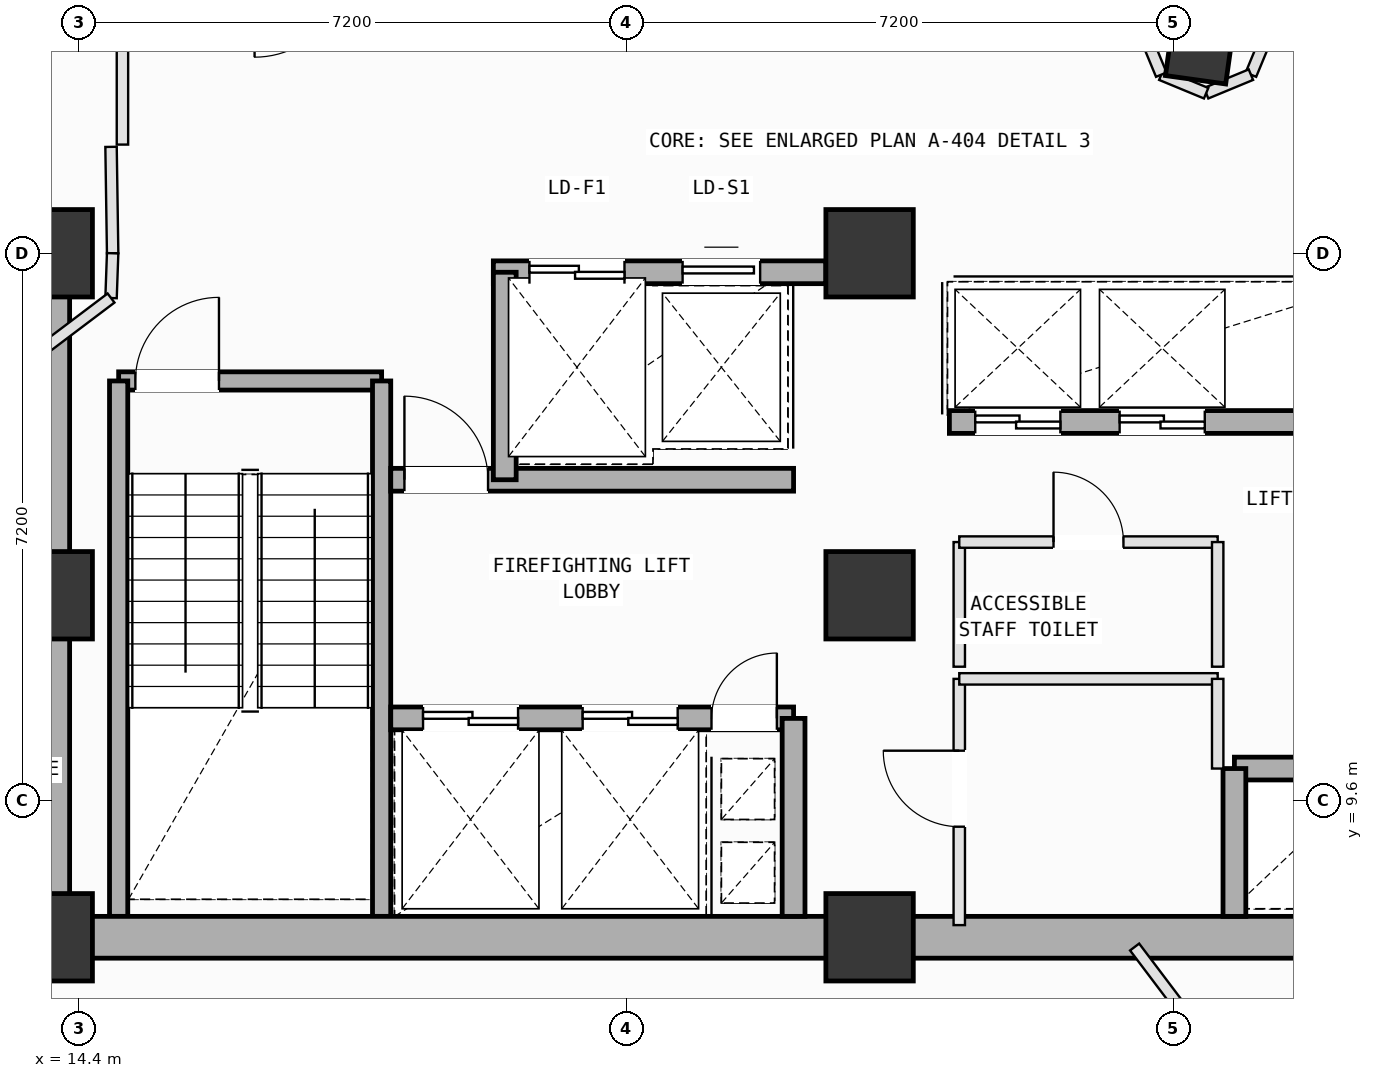
"""IFC4 building model, lengths in metres.
Left out: names, types, materials, properties, quantities, classifications, styles, units other than length and angle.
Written with IfcOpenShell. Run it as: python <this file> out.ifc"""

import sys

from ifc_helpers import new_model, si_unit, direction, frame, frame_2d, origin, origin_2d, place, context, subcontext, project, spatial, rectangle, extrude, element, fill, save


model = new_model("IFC4")
c1 = context("Model", 3, precision=1e-05, world=origin(), true_north=direction((0.0, 1.0)))
c2 = subcontext(c1, "Body", "Model", "MODEL_VIEW")
j1 = project(units=[si_unit("LENGTHUNIT", "METRE"), si_unit("PLANEANGLEUNIT", "RADIAN")], contexts=[c1])
p1 = place(None, origin())
s1 = spatial("IfcSite", under=j1, at=p1, CompositionType="ELEMENT")
p2 = place(p1, origin())
s2 = spatial("IfcBuilding", under=s1, at=p2, CompositionType="ELEMENT")
p3 = place(p2, frame((0.0, 0.0, 181.8)))
s3 = spatial("IfcBuildingStorey", under=s2, at=p3, CompositionType="ELEMENT", Elevation=181.8)
for number, where, z_axis, x_axis in (
    (1, (14.0, 7.8, 0.0), (0.0, 0.0, 1.0), (1.0, 0.0, 0.0)),
    (2, (14.0, 12.3, 0.0), (0.0, 0.0, 1.0), (1.0, 0.0, 0.0)),
    (3, (14.0, 16.8, 0.0), (0.0, 0.0, 1.0), (1.0, 0.0, 0.0)),
    (4, (24.8, 7.8, 0.0), (0.0, 0.0, 1.0), (1.0, 0.0, 0.0)),
    (5, (24.8, 12.3, 0.0), (0.0, 0.0, 1.0), (1.0, 0.0, 0.0)),
    (6, (24.8, 16.8, 0.0), (0.0, 0.0, 1.0), (1.0, 0.0, 0.0)),
):
    element("IfcColumn", number, at=place(p3, frame(where, z_axis=z_axis, x_axis=x_axis)), inside=s3, PredefinedType="COLUMN", context=c2, shape_type="SweptSolid", body=[
        extrude(rectangle(XDim=1.15, YDim=1.15, at=origin_2d()), origin(), (0.0, 0.0, 1.0), 4.0),
    ])
p4 = place(p3, frame((29.186, 19.776, 0.002), z_axis=(0.020946197976, -0.018137086877, 0.999616077737), x_axis=(-0.657890555794, 0.752613449927, 0.027441056587)))
e7 = element("IfcColumn", 7, at=p4, inside=s3, PredefinedType="COLUMN", context=c2, shape_type="SweptSolid", body=[
    extrude(rectangle(XDim=1.4, YDim=0.8, at=origin_2d()), origin(), (0.0, 0.0, 1.0), 3.998),
])
p5 = place(p3, frame((15.388, 3.365, 0.0), z_axis=(0.0, 0.0, 1.0), x_axis=(-0.602528511306, 0.798097358136, 0.0)))
e8 = element("IfcWall", 8, at=p5, inside=s3, PredefinedType="SOLIDWALL", context=c2, shape_type="SweptSolid", body=[
    extrude(rectangle(XDim=7.36, YDim=0.28, at=frame_2d((3.68, 0.0))), origin(), (0.0, 0.0, 1.0), 3.065),
])
p6 = place(p5, frame((2.514, 0.0, 0.75)))
e9 = element("IfcOpeningElement", 9, at=p6, cuts=e8, PredefinedType="OPENING", context=c2, shape_type="SweptSolid", body=[
    extrude(rectangle(XDim=1.6, YDim=1.95, at=frame_2d((0.8, 0.975))), frame((0.0, 0.15, 0.0), z_axis=(0.0, -1.0, 0.0), x_axis=(1.0, 0.0, 0.0)), (0.0, 0.0, 1.0), 0.3),
])
p7 = place(p3, frame((14.92, 15.12, 0.0), z_axis=(0.0, 0.0, 1.0), x_axis=(1.0, 0.0, 0.0)))
e10 = element("IfcWall", 10, at=p7, inside=s3, PredefinedType="SOLIDWALL", context=c2, shape_type="SweptSolid", body=[
    extrude(rectangle(XDim=3.46, YDim=0.24, at=frame_2d((1.73, 0.0))), origin(), (0.0, 0.0, 1.0), 3.78),
])
p8 = place(p7, frame((0.22, 0.0, 0.0)))
e11 = element("IfcOpeningElement", 11, at=p8, cuts=e10, PredefinedType="OPENING", context=c2, shape_type="SweptSolid", body=[
    extrude(rectangle(XDim=1.1, YDim=2.15, at=frame_2d((0.55, 1.075))), frame((0.0, 0.13, 0.0), z_axis=(0.0, -1.0, 0.0), x_axis=(1.0, 0.0, 0.0)), (0.0, 0.0, 1.0), 0.26),
])
for number, where, z_axis, x_axis in (
    (12, (18.38, 15.12, 0.0), (0.0, 0.0, 1.0), (0.0, -1.0, 0.0)),
    (13, (14.92, 8.075, 0.0), (0.0, 0.0, 1.0), (0.0, 1.0, 0.0)),
):
    element("IfcWall", number, at=place(p3, frame(where, z_axis=z_axis, x_axis=x_axis)), inside=s3, PredefinedType="SOLIDWALL", context=c2, shape_type="SweptSolid", body=[
        extrude(rectangle(XDim=7.045, YDim=0.24, at=frame_2d((3.522, 0.0))), origin(), (0.0, 0.0, 1.0), 3.78),
    ])
for number, where, z_axis, x_axis in (
    (14, (14.0, 7.8, 0.0), (0.0, 0.0, 1.0), (1.0, 0.0, 0.0)),
    (15, (24.8, 7.8, 0.0), (0.0, 0.0, 1.0), (1.0, 0.0, 0.0)),
):
    element("IfcWall", number, at=place(p3, frame(where, z_axis=z_axis, x_axis=x_axis)), inside=s3, PredefinedType="SHEAR", context=c2, shape_type="SweptSolid", body=[
        extrude(rectangle(XDim=10.8, YDim=0.55, at=frame_2d((5.4, 0.0))), origin(), (0.0, 0.0, 1.0), 3.78),
    ])
p9 = place(p3, frame((14.0, 16.8, 0.0), z_axis=(0.0, 0.0, 1.0), x_axis=(0.0, -1.0, 0.0)))
e16 = element("IfcWall", 16, at=p9, inside=s3, PredefinedType="SHEAR", context=c2, shape_type="SweptSolid", body=[
    extrude(rectangle(XDim=9.0, YDim=0.55, at=frame_2d((4.5, 0.0))), origin(), (0.0, 0.0, 1.0), 3.78),
])
p10 = place(p3, frame((19.85, 16.55, 0.0), z_axis=(0.0, 0.0, 1.0), x_axis=(1.0, 0.0, 0.0)))
e17 = element("IfcWall", 17, at=p10, inside=s3, PredefinedType="SOLIDWALL", context=c2, shape_type="SweptSolid", body=[
    extrude(rectangle(XDim=4.375, YDim=0.3, at=frame_2d((2.188, 0.0))), origin(), (0.0, 0.0, 1.0), 3.78),
])
p11 = place(p10, frame((0.475, 0.0, 0.0)))
e18 = element("IfcOpeningElement", 18, at=p11, cuts=e17, PredefinedType="OPENING", context=c2, shape_type="SweptSolid", body=[
    extrude(rectangle(XDim=1.25, YDim=2.18, at=frame_2d((0.625, 1.09))), frame((0.0, 0.16, 0.0), z_axis=(0.0, -1.0, 0.0), x_axis=(1.0, 0.0, 0.0)), (0.0, 0.0, 1.0), 0.32),
])
p12 = place(p10, frame((2.49, 0.0, 0.0)))
e19 = element("IfcOpeningElement", 19, at=p12, cuts=e17, PredefinedType="OPENING", context=c2, shape_type="SweptSolid", body=[
    extrude(rectangle(XDim=1.02, YDim=2.12, at=frame_2d((0.51, 1.06))), frame((0.0, 0.16, 0.0), z_axis=(0.0, -1.0, 0.0), x_axis=(1.0, 0.0, 0.0)), (0.0, 0.0, 1.0), 0.32),
])
p13 = place(p3, frame((18.5, 10.68, 0.0), z_axis=(0.0, 0.0, 1.0), x_axis=(1.0, 0.0, 0.0)))
e20 = element("IfcWall", 20, at=p13, inside=s3, PredefinedType="SOLIDWALL", context=c2, shape_type="SweptSolid", body=[
    extrude(rectangle(XDim=5.3, YDim=0.3, at=frame_2d((2.65, 0.0))), origin(), (0.0, 0.0, 1.0), 3.78),
])
p14 = place(p13, frame((4.22, 0.0, 0.0)))
e21 = element("IfcOpeningElement", 21, at=p14, cuts=e20, PredefinedType="OPENING", context=c2, shape_type="SweptSolid", body=[
    extrude(rectangle(XDim=0.86, YDim=2.06, at=frame_2d((0.43, 1.03))), frame((0.0, 0.16, 0.0), z_axis=(0.0, -1.0, 0.0), x_axis=(1.0, 0.0, 0.0)), (0.0, 0.0, 1.0), 0.32),
])
p15 = place(p13, frame((0.425, 0.0, 0.0)))
e22 = element("IfcOpeningElement", 22, at=p15, cuts=e20, PredefinedType="OPENING", context=c2, shape_type="SweptSolid", body=[
    extrude(rectangle(XDim=1.25, YDim=2.18, at=frame_2d((0.625, 1.09))), frame((0.0, 0.16, 0.0), z_axis=(0.0, -1.0, 0.0), x_axis=(1.0, 0.0, 0.0)), (0.0, 0.0, 1.0), 0.32),
])
p16 = place(p13, frame((2.525, 0.0, 0.0)))
e23 = element("IfcOpeningElement", 23, at=p16, cuts=e20, PredefinedType="OPENING", context=c2, shape_type="SweptSolid", body=[
    extrude(rectangle(XDim=1.25, YDim=2.18, at=frame_2d((0.625, 1.09))), frame((0.0, 0.16, 0.0), z_axis=(0.0, -1.0, 0.0), x_axis=(1.0, 0.0, 0.0)), (0.0, 0.0, 1.0), 0.32),
])
p17 = place(p3, frame((18.5, 13.82, 0.0), z_axis=(0.0, 0.0, 1.0), x_axis=(1.0, 0.0, 0.0)))
e24 = element("IfcWall", 24, at=p17, inside=s3, PredefinedType="SOLIDWALL", context=c2, shape_type="SweptSolid", body=[
    extrude(rectangle(XDim=5.3, YDim=0.3, at=frame_2d((2.65, 0.0))), origin(), (0.0, 0.0, 1.0), 3.78),
])
p18 = place(p17, frame((0.18, 0.0, 0.0)))
e25 = element("IfcOpeningElement", 25, at=p18, cuts=e24, PredefinedType="OPENING", context=c2, shape_type="SweptSolid", body=[
    extrude(rectangle(XDim=1.1, YDim=2.15, at=frame_2d((0.55, 1.075))), frame((0.0, 0.16, 0.0), z_axis=(0.0, -1.0, 0.0), x_axis=(1.0, 0.0, 0.0)), (0.0, 0.0, 1.0), 0.32),
])
p19 = place(p3, frame((23.8, 8.075, 0.0), z_axis=(0.0, 0.0, 1.0), x_axis=(0.0, 1.0, 0.0)))
e26 = element("IfcWall", 26, at=p19, inside=s3, PredefinedType="SOLIDWALL", context=c2, shape_type="SweptSolid", body=[
    extrude(rectangle(XDim=2.605, YDim=0.3, at=frame_2d((1.302, 0.0))), origin(), (0.0, 0.0, 1.0), 3.78),
])
p20 = place(p3, frame((20.0, 13.82, 0.0), z_axis=(0.0, 0.0, 1.0), x_axis=(0.0, 1.0, 0.0)))
e27 = element("IfcWall", 27, at=p20, inside=s3, PredefinedType="SOLIDWALL", context=c2, shape_type="SweptSolid", body=[
    extrude(rectangle(XDim=2.73, YDim=0.3, at=frame_2d((1.365, 0.0))), origin(), (0.0, 0.0, 1.0), 3.78),
])
p21 = place(p3, frame((29.6, 10.02, 0.0), z_axis=(0.0, 0.0, 1.0), x_axis=(1.0, 0.0, 0.0)))
e28 = element("IfcWall", 28, at=p21, inside=s3, PredefinedType="SOLIDWALL", context=c2, shape_type="SweptSolid", body=[
    extrude(rectangle(XDim=1.7, YDim=0.3, at=frame_2d((0.85, 0.0))), origin(), (0.0, 0.0, 1.0), 3.78),
])
p22 = place(p3, frame((29.6, 8.075, 0.0), z_axis=(0.0, 0.0, 1.0), x_axis=(0.0, 1.0, 0.0)))
e29 = element("IfcWall", 29, at=p22, inside=s3, PredefinedType="SOLIDWALL", context=c2, shape_type="SweptSolid", body=[
    extrude(rectangle(XDim=1.945, YDim=0.3, at=frame_2d((0.973, 0.0))), origin(), (0.0, 0.0, 1.0), 3.78),
])
p23 = place(p3, frame((25.85, 14.58, 0.0), z_axis=(0.0, 0.0, 1.0), x_axis=(1.0, 0.0, 0.0)))
e30 = element("IfcWall", 30, at=p23, inside=s3, PredefinedType="SOLIDWALL", context=c2, shape_type="SweptSolid", body=[
    extrude(rectangle(XDim=5.45, YDim=0.3, at=frame_2d((2.725, 0.0))), origin(), (0.0, 0.0, 1.0), 3.78),
])
p24 = place(p23, frame((0.34, 0.0, 0.0)))
e31 = element("IfcOpeningElement", 31, at=p24, cuts=e30, PredefinedType="OPENING", context=c2, shape_type="SweptSolid", body=[
    extrude(rectangle(XDim=1.12, YDim=2.15, at=frame_2d((0.56, 1.075))), frame((0.0, 0.16, 0.0), z_axis=(0.0, -1.0, 0.0), x_axis=(1.0, 0.0, 0.0)), (0.0, 0.0, 1.0), 0.32),
])
p25 = place(p23, frame((2.24, 0.0, 0.0)))
e32 = element("IfcOpeningElement", 32, at=p25, cuts=e30, PredefinedType="OPENING", context=c2, shape_type="SweptSolid", body=[
    extrude(rectangle(XDim=1.12, YDim=2.15, at=frame_2d((0.56, 1.075))), frame((0.0, 0.16, 0.0), z_axis=(0.0, -1.0, 0.0), x_axis=(1.0, 0.0, 0.0)), (0.0, 0.0, 1.0), 0.32),
])
p26 = place(p3, frame((25.98, 7.96, 0.0), z_axis=(0.0, 0.0, 1.0), x_axis=(0.0, 1.0, 0.0)))
e33 = element("IfcWall", 33, at=p26, inside=s3, PredefinedType="PARTITIONING", context=c2, shape_type="SweptSolid", body=[
    extrude(rectangle(XDim=3.24, YDim=0.15, at=frame_2d((1.62, 0.0))), origin(), (0.0, 0.0, 1.0), 3.78),
])
p27 = place(p26, frame((1.295, 0.0, 0.0)))
e34 = element("IfcOpeningElement", 34, at=p27, cuts=e33, PredefinedType="OPENING", context=c2, shape_type="SweptSolid", body=[
    extrude(rectangle(XDim=1.0, YDim=2.12, at=frame_2d((0.5, 1.06))), frame((0.0, 0.085, 0.0), z_axis=(0.0, -1.0, 0.0), x_axis=(1.0, 0.0, 0.0)), (0.0, 0.0, 1.0), 0.17),
])
p28 = place(p3, frame((25.98, 11.2, 0.0), z_axis=(0.0, 0.0, 1.0), x_axis=(1.0, 0.0, 0.0)))
e35 = element("IfcWall", 35, at=p28, inside=s3, PredefinedType="PARTITIONING", context=c2, shape_type="SweptSolid", body=[
    extrude(rectangle(XDim=3.4, YDim=0.15, at=frame_2d((1.7, 0.0))), origin(), (0.0, 0.0, 1.0), 3.78),
])
p29 = place(p3, frame((29.38, 11.2, 0.0), z_axis=(0.0, 0.0, 1.0), x_axis=(0.0, -1.0, 0.0)))
e36 = element("IfcWall", 36, at=p29, inside=s3, PredefinedType="PARTITIONING", context=c2, shape_type="SweptSolid", body=[
    extrude(rectangle(XDim=1.18, YDim=0.15, at=frame_2d((0.59, 0.0))), origin(), (0.0, 0.0, 1.0), 3.78),
])
p30 = place(p3, frame((25.98, 11.36, 0.0), z_axis=(0.0, 0.0, 1.0), x_axis=(0.0, 1.0, 0.0)))
e37 = element("IfcWall", 37, at=p30, inside=s3, PredefinedType="PARTITIONING", context=c2, shape_type="SweptSolid", body=[
    extrude(rectangle(XDim=1.64, YDim=0.15, at=frame_2d((0.82, 0.0))), origin(), (0.0, 0.0, 1.0), 3.78),
])
p31 = place(p3, frame((25.98, 13.0, 0.0), z_axis=(0.0, 0.0, 1.0), x_axis=(1.0, 0.0, 0.0)))
e38 = element("IfcWall", 38, at=p31, inside=s3, PredefinedType="PARTITIONING", context=c2, shape_type="SweptSolid", body=[
    extrude(rectangle(XDim=3.4, YDim=0.15, at=frame_2d((1.7, 0.0))), origin(), (0.0, 0.0, 1.0), 3.78),
])
p32 = place(p31, frame((1.24, 0.0, 0.0)))
e39 = element("IfcOpeningElement", 39, at=p32, cuts=e38, PredefinedType="OPENING", context=c2, shape_type="SweptSolid", body=[
    extrude(rectangle(XDim=0.92, YDim=2.1, at=frame_2d((0.46, 1.05))), frame((0.0, 0.085, 0.0), z_axis=(0.0, -1.0, 0.0), x_axis=(1.0, 0.0, 0.0)), (0.0, 0.0, 1.0), 0.17),
])
p33 = place(p3, frame((29.38, 13.0, 0.0), z_axis=(0.0, 0.0, 1.0), x_axis=(0.0, -1.0, 0.0)))
e40 = element("IfcWall", 40, at=p33, inside=s3, PredefinedType="PARTITIONING", context=c2, shape_type="SweptSolid", body=[
    extrude(rectangle(XDim=1.64, YDim=0.15, at=frame_2d((0.82, 0.0))), origin(), (0.0, 0.0, 1.0), 3.78),
])
p34 = place(p3, frame((28.287, 7.672, 0.0), z_axis=(0.0, 0.0, 1.0), x_axis=(0.602494949449, -0.798122694758, 0.0)))
e41 = element("IfcWall", 41, at=p34, inside=s3, PredefinedType="PARTITIONING", context=c2, shape_type="SweptSolid", body=[
    extrude(rectangle(XDim=11.666, YDim=0.15, at=frame_2d((5.833, 0.0))), origin(), (0.0, 0.0, 1.0), 3.78),
])
p35 = place(p34, frame((5.591, 0.0, 0.0)))
e42 = element("IfcOpeningElement", 42, at=p35, cuts=e41, PredefinedType="OPENING", context=c2, shape_type="SweptSolid", body=[
    extrude(rectangle(XDim=0.86, YDim=2.06, at=frame_2d((0.43, 1.03))), frame((0.0, 0.085, 0.0), z_axis=(0.0, -1.0, 0.0), x_axis=(1.0, 0.0, 0.0)), (0.0, 0.0, 1.0), 0.17),
])
p36 = place(p3, frame((14.97, 20.55, 0.0), z_axis=(0.0, 0.0, 1.0), x_axis=(0.0, -1.0, 0.0)))
e43 = element("IfcWall", 43, at=p36, inside=s3, PredefinedType="PARTITIONING", context=c2, shape_type="SweptSolid", body=[
    extrude(rectangle(XDim=2.32, YDim=0.15, at=frame_2d((1.16, 0.0))), origin(), (0.0, 0.0, 1.0), 3.78),
])
p37 = place(p3, frame((14.82, 18.2, 0.0), z_axis=(0.0, 0.0, 1.0), x_axis=(0.01499656939, -0.99988754513, 0.0)))
e44 = element("IfcWall", 44, at=p37, inside=s3, PredefinedType="PARTITIONING", context=c2, shape_type="SweptSolid", body=[
    extrude(rectangle(XDim=1.4, YDim=0.15, at=frame_2d((0.7, 0.0))), origin(), (0.0, 0.0, 1.0), 3.78),
])
p38 = place(p3, frame((14.841, 16.8, 0.0), z_axis=(0.0, 0.0, 1.0), x_axis=(-0.035617667676, -0.999365489573, 0.0)))
e45 = element("IfcWall", 45, at=p38, inside=s3, PredefinedType="PARTITIONING", context=c2, shape_type="SweptSolid", body=[
    extrude(rectangle(XDim=0.59, YDim=0.15, at=frame_2d((0.295, 0.0))), origin(), (0.0, 0.0, 1.0), 3.78),
])
p39 = place(p3, frame((14.82, 16.211, 0.0), z_axis=(0.0, 0.0, 1.0), x_axis=(-0.798130998248, -0.602483949691, 0.0)))
e46 = element("IfcWall", 46, at=p39, inside=s3, PredefinedType="PARTITIONING", context=c2, shape_type="SweptSolid", body=[
    extrude(rectangle(XDim=1.524, YDim=0.15, at=frame_2d((0.762, 0.0))), origin(), (0.0, 0.0, 1.0), 3.78),
])
p40 = place(p3, frame((6.301, 15.593, 0.0), z_axis=(0.0, 0.0, 1.0), x_axis=(0.798111656514, 0.60250957149, 0.0)))
e47 = element("IfcWall", 47, at=p40, inside=s3, PredefinedType="PARTITIONING", context=c2, shape_type="SweptSolid", body=[
    extrude(rectangle(XDim=13.635, YDim=0.15, at=frame_2d((6.817, 0.0))), origin(), (0.0, 0.0, 1.0), 3.78),
])
p41 = place(p3, frame((3.409, 19.424, 0.0), z_axis=(0.0, 0.0, 1.0), x_axis=(0.798120266847, 0.60249816568, 0.0)))
e48 = element("IfcWall", 48, at=p41, inside=s3, PredefinedType="PARTITIONING", context=c2, shape_type="SweptSolid", body=[
    extrude(rectangle(XDim=13.635, YDim=0.15, at=frame_2d((6.817, 0.0))), origin(), (0.0, 0.0, 1.0), 3.78),
])
p42 = place(p3, frame((30.061, 19.74, 0.0), z_axis=(0.0, 0.0, 1.0), x_axis=(-0.382306769343, -0.924035461503, 0.0)))
e49 = element("IfcWall", 49, at=p42, inside=s3, PredefinedType="PARTITIONING", context=c2, shape_type="SweptSolid", body=[
    extrude(rectangle(XDim=0.639, YDim=0.15, at=frame_2d((0.319, 0.0))), origin(), (0.0, 0.0, 1.0), 3.78),
])
p43 = place(p3, frame((29.817, 19.15, 0.0), z_axis=(0.0, 0.0, 1.0), x_axis=(-0.923890787601, -0.382656259044, 0.0)))
e50 = element("IfcWall", 50, at=p43, inside=s3, PredefinedType="PARTITIONING", context=c2, shape_type="SweptSolid", body=[
    extrude(rectangle(XDim=0.637, YDim=0.15, at=frame_2d((0.319, 0.0))), origin(), (0.0, 0.0, 1.0), 3.415),
])
for number, where, z_axis, x_axis in (
    (51, (29.228, 18.906, 0.0), (0.0, 0.0, 1.0), (-0.924, 0.382, 0.0)),
    (52, (28.638, 19.15, 0.0), (0.0, 0.0, 1.0), (-0.382, 0.924, 0.0)),
):
    element("IfcWall", number, at=place(p3, frame(where, z_axis=z_axis, x_axis=x_axis)), inside=s3, PredefinedType="PARTITIONING", context=c2, shape_type="SweptSolid", body=[
        extrude(rectangle(XDim=0.638, YDim=0.15, at=frame_2d((0.319, 0.0))), origin(), (0.0, 0.0, 1.0), 3.78),
    ])
p44 = place(p8, origin())
e53 = element("IfcDoor", 53, at=p44, inside=s3, OperationType="SINGLE_SWING_RIGHT", PredefinedType="DOOR", context=c2, shape_type="SweptSolid", body=[
    extrude(rectangle(XDim=1.1, YDim=2.15, at=frame_2d((0.55, 1.075))), frame((0.0, 0.025, 0.0), z_axis=(0.0, -1.0, 0.0), x_axis=(1.0, 0.0, 0.0)), (0.0, 0.0, 1.0), 0.05),
])
fill(e11, e53)
p45 = place(p14, origin())
e54 = element("IfcDoor", 54, at=p45, inside=s3, OperationType="SINGLE_SWING_RIGHT", PredefinedType="DOOR", context=c2, shape_type="SweptSolid", body=[
    extrude(rectangle(XDim=0.86, YDim=2.06, at=frame_2d((0.43, 1.03))), frame((0.0, 0.025, 0.0), z_axis=(0.0, -1.0, 0.0), x_axis=(1.0, 0.0, 0.0)), (0.0, 0.0, 1.0), 0.05),
])
fill(e21, e54)
p46 = place(p18, origin())
e55 = element("IfcDoor", 55, at=p46, inside=s3, OperationType="SINGLE_SWING_LEFT", PredefinedType="DOOR", context=c2, shape_type="SweptSolid", body=[
    extrude(rectangle(XDim=1.1, YDim=2.15, at=frame_2d((0.55, 1.075))), frame((0.0, 0.025, 0.0), z_axis=(0.0, -1.0, 0.0), x_axis=(1.0, 0.0, 0.0)), (0.0, 0.0, 1.0), 0.05),
])
fill(e25, e55)
p47 = place(p15, origin())
e56 = element("IfcDoor", 56, at=p47, inside=s3, OperationType="DOUBLE_DOOR_SLIDING", PredefinedType="DOOR", context=c2, shape_type="SweptSolid", body=[
    extrude(rectangle(XDim=1.25, YDim=2.18, at=frame_2d((0.625, 1.09))), frame((0.0, 0.025, 0.0), z_axis=(0.0, -1.0, 0.0), x_axis=(1.0, 0.0, 0.0)), (0.0, 0.0, 1.0), 0.05),
])
fill(e22, e56)
p48 = place(p16, origin())
e57 = element("IfcDoor", 57, at=p48, inside=s3, OperationType="DOUBLE_DOOR_SLIDING", PredefinedType="DOOR", context=c2, shape_type="SweptSolid", body=[
    extrude(rectangle(XDim=1.25, YDim=2.18, at=frame_2d((0.625, 1.09))), frame((0.0, 0.025, 0.0), z_axis=(0.0, -1.0, 0.0), x_axis=(1.0, 0.0, 0.0)), (0.0, 0.0, 1.0), 0.05),
])
fill(e23, e57)
p49 = place(p24, origin())
e58 = element("IfcDoor", 58, at=p49, inside=s3, OperationType="DOUBLE_DOOR_SLIDING", PredefinedType="DOOR", context=c2, shape_type="SweptSolid", body=[
    extrude(rectangle(XDim=1.12, YDim=2.15, at=frame_2d((0.56, 1.075))), frame((0.0, 0.025, 0.0), z_axis=(0.0, -1.0, 0.0), x_axis=(1.0, 0.0, 0.0)), (0.0, 0.0, 1.0), 0.05),
])
fill(e31, e58)
p50 = place(p25, origin())
e59 = element("IfcDoor", 59, at=p50, inside=s3, OperationType="DOUBLE_DOOR_SLIDING", PredefinedType="DOOR", context=c2, shape_type="SweptSolid", body=[
    extrude(rectangle(XDim=1.12, YDim=2.15, at=frame_2d((0.56, 1.075))), frame((0.0, 0.025, 0.0), z_axis=(0.0, -1.0, 0.0), x_axis=(1.0, 0.0, 0.0)), (0.0, 0.0, 1.0), 0.05),
])
fill(e32, e59)
p51 = place(p11, origin())
e60 = element("IfcDoor", 60, at=p51, inside=s3, OperationType="DOUBLE_DOOR_SLIDING", PredefinedType="DOOR", context=c2, shape_type="SweptSolid", body=[
    extrude(rectangle(XDim=1.25, YDim=2.18, at=frame_2d((0.625, 1.09))), frame((0.0, 0.025, 0.0), z_axis=(0.0, -1.0, 0.0), x_axis=(1.0, 0.0, 0.0)), (0.0, 0.0, 1.0), 0.05),
])
fill(e18, e60)
p52 = place(p12, origin())
e61 = element("IfcDoor", 61, at=p52, inside=s3, OperationType="SLIDING_TO_LEFT", PredefinedType="DOOR", context=c2, shape_type="SweptSolid", body=[
    extrude(rectangle(XDim=1.02, YDim=2.12, at=frame_2d((0.51, 1.06))), frame((0.0, 0.025, 0.0), z_axis=(0.0, -1.0, 0.0), x_axis=(1.0, 0.0, 0.0)), (0.0, 0.0, 1.0), 0.05),
])
fill(e19, e61)
p53 = place(p27, origin())
e62 = element("IfcDoor", 62, at=p53, inside=s3, OperationType="SINGLE_SWING_RIGHT", PredefinedType="DOOR", context=c2, shape_type="SweptSolid", body=[
    extrude(rectangle(XDim=1.0, YDim=2.12, at=frame_2d((0.5, 1.06))), frame((0.0, 0.025, 0.0), z_axis=(0.0, -1.0, 0.0), x_axis=(1.0, 0.0, 0.0)), (0.0, 0.0, 1.0), 0.05),
])
fill(e34, e62)
p54 = place(p32, origin())
e63 = element("IfcDoor", 63, at=p54, inside=s3, OperationType="SINGLE_SWING_LEFT", PredefinedType="DOOR", context=c2, shape_type="SweptSolid", body=[
    extrude(rectangle(XDim=0.92, YDim=2.1, at=frame_2d((0.46, 1.05))), frame((0.0, 0.025, 0.0), z_axis=(0.0, -1.0, 0.0), x_axis=(1.0, 0.0, 0.0)), (0.0, 0.0, 1.0), 0.05),
])
fill(e39, e63)
save(model, sys.argv[1])
